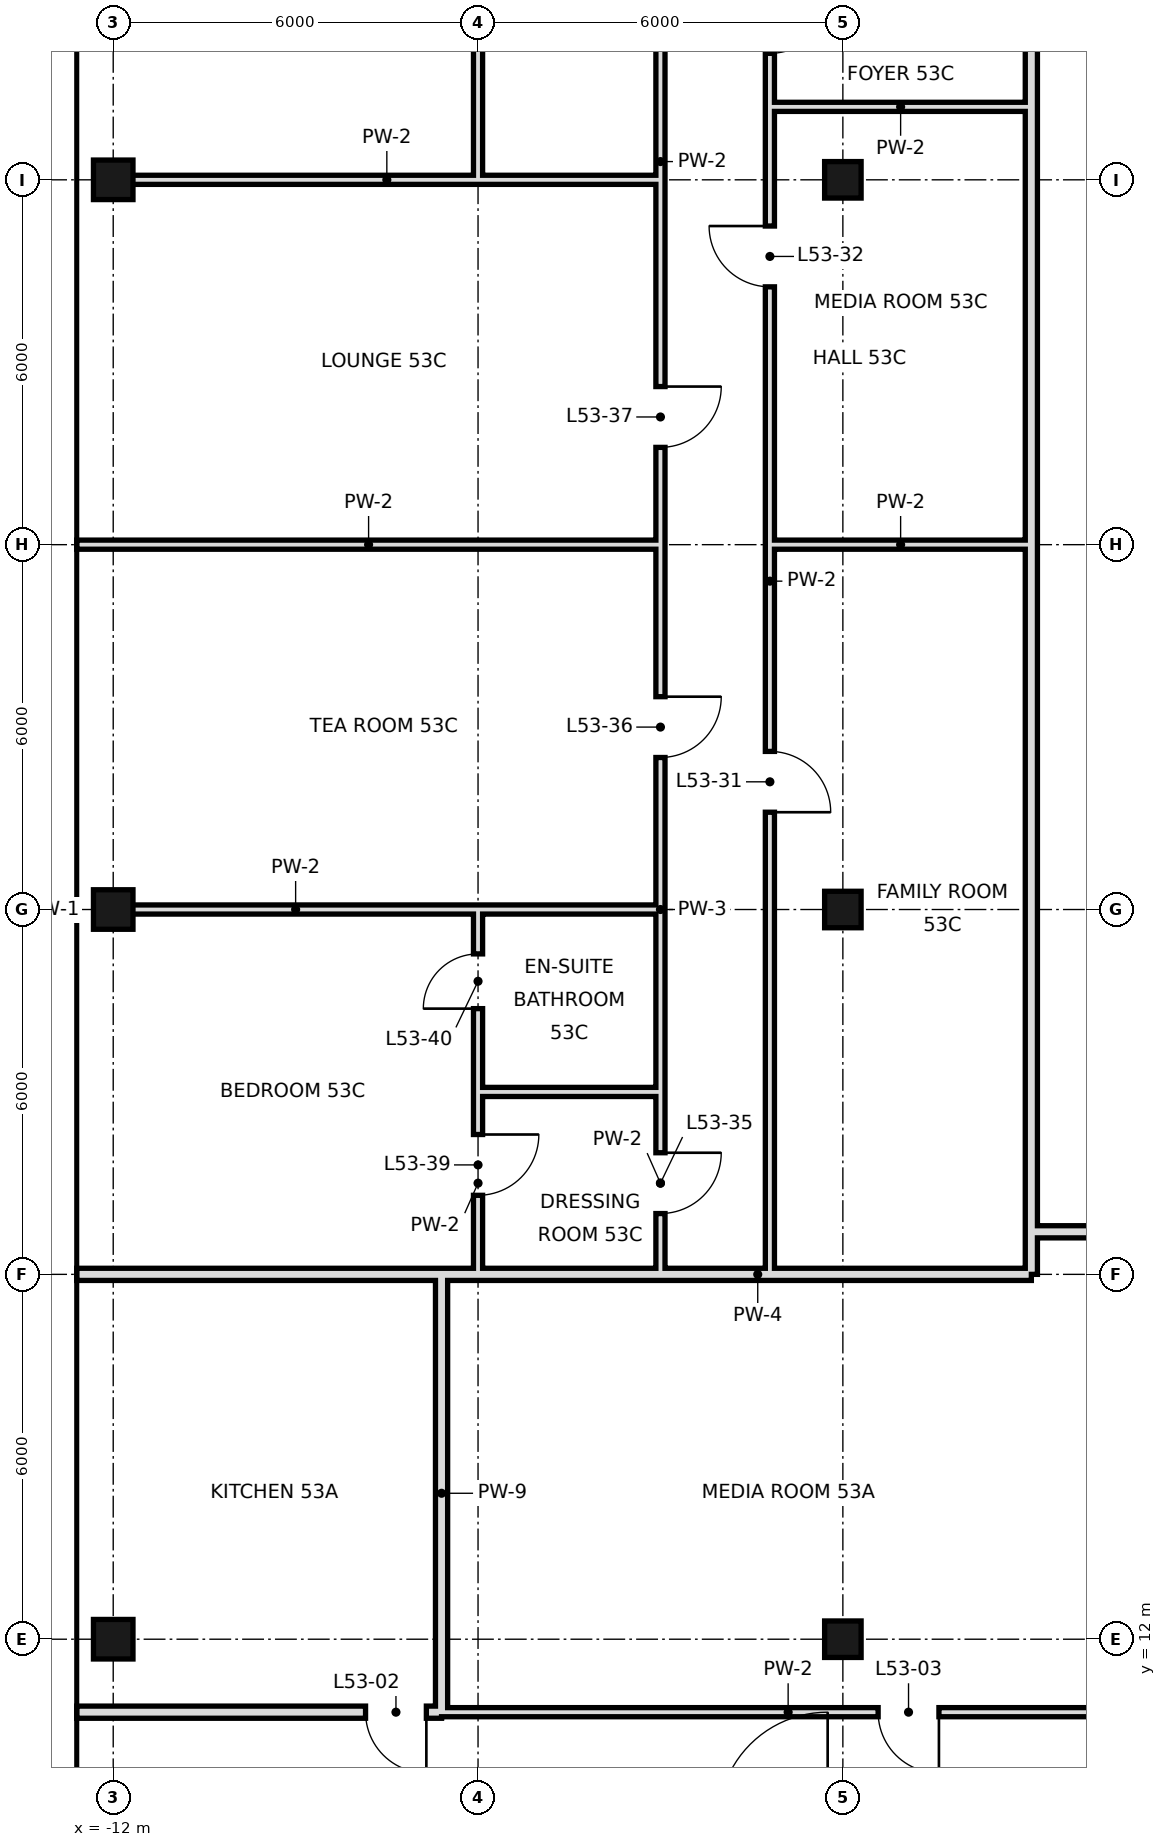
"""IFC4 building model, lengths in metres.
Left out: names, types, materials, properties, quantities, classifications, styles, units other than length and angle.
Written with IfcOpenShell. Run it as: python <this file> out.ifc"""

import sys

from ifc_helpers import new_model, si_unit, direction, frame, frame_2d, origin, origin_2d, place, context, subcontext, project, spatial, rectangle, hollow_rectangle, extrude, element, fill, save


model = new_model("IFC4")
c1 = context("Model", 3, precision=1e-05, world=origin(), true_north=direction((0.0, 1.0)))
c2 = subcontext(c1, "Body", "Model", "MODEL_VIEW")
j1 = project(units=[si_unit("LENGTHUNIT", "METRE"), si_unit("PLANEANGLEUNIT", "RADIAN")], contexts=[c1])
p1 = place(None, origin())
s1 = spatial("IfcSite", under=j1, at=p1, CompositionType="ELEMENT")
p2 = place(p1, origin())
s2 = spatial("IfcBuilding", under=s1, at=p2, CompositionType="ELEMENT")
p3 = place(p2, frame((0.0, 0.0, 226.2)))
s3 = spatial("IfcBuildingStorey", under=s2, at=p3, CompositionType="ELEMENT", Elevation=226.2)
for number, where, z_axis, x_axis in (
    (1, (-12.0, 12.0, 0.0), (0.0, 0.0, 1.0), (1.0, 0.0, 0.0)),
    (2, (-12.0, 24.0, 0.0), (0.0, 0.0, 1.0), (1.0, 0.0, 0.0)),
    (3, (-12.0, 36.0, 0.0), (0.0, 0.0, 1.0), (1.0, 0.0, 0.0)),
):
    element("IfcColumn", number, at=place(p3, frame(where, z_axis=z_axis, x_axis=x_axis)), inside=s3, PredefinedType="COLUMN", context=c2, shape_type="SweptSolid", body=[
        extrude(hollow_rectangle(XDim=0.65, YDim=0.65, WallThickness=0.032, at=origin_2d()), origin(), (0.0, 0.0, 1.0), 3.6),
    ])
for number, where, z_axis, x_axis in (
    (4, (0.0, 12.0, 0.0), (0.0, 0.0, 1.0), (1.0, 0.0, 0.0)),
    (5, (0.0, 24.0, 0.0), (0.0, 0.0, 1.0), (1.0, 0.0, 0.0)),
    (6, (0.0, 36.0, 0.0), (0.0, 0.0, 1.0), (1.0, 0.0, 0.0)),
):
    element("IfcColumn", number, at=place(p3, frame(where, z_axis=z_axis, x_axis=x_axis)), inside=s3, PredefinedType="COLUMN", context=c2, shape_type="SweptSolid", body=[
        extrude(hollow_rectangle(XDim=0.6, YDim=0.6, WallThickness=0.028, at=origin_2d()), origin(), (0.0, 0.0, 1.0), 3.6),
    ])
p4 = place(p3, frame((-1.2, 18.0, 0.0), z_axis=(0.0, 0.0, 1.0), x_axis=(0.0, 1.0, 0.0)))
e7 = element("IfcWall", 7, at=p4, inside=s3, PredefinedType="PARTITIONING", context=c2, shape_type="SweptSolid", body=[
    extrude(rectangle(XDim=22.8, YDim=0.15, at=frame_2d((11.4, 0.0))), origin(), (0.0, 0.0, 1.0), 3.42),
])
p5 = place(p4, frame((20.08, 0.0, 0.0)))
e8 = element("IfcOpeningElement", 8, at=p5, cuts=e7, PredefinedType="OPENING", context=c2, shape_type="SweptSolid", body=[
    extrude(rectangle(XDim=1.0, YDim=2.4, at=frame_2d((0.5, 1.2))), frame((0.0, 0.085, 0.0), z_axis=(0.0, -1.0, 0.0), x_axis=(1.0, 0.0, 0.0)), (0.0, 0.0, 1.0), 0.17),
])
p6 = place(p4, frame((7.6, 0.0, 0.0)))
e9 = element("IfcOpeningElement", 9, at=p6, cuts=e7, PredefinedType="OPENING", context=c2, shape_type="SweptSolid", body=[
    extrude(rectangle(XDim=1.0, YDim=2.4, at=frame_2d((0.5, 1.2))), frame((0.0, 0.085, 0.0), z_axis=(0.0, -1.0, 0.0), x_axis=(1.0, 0.0, 0.0)), (0.0, 0.0, 1.0), 0.17),
])
p7 = place(p4, frame((16.24, 0.0, 0.0)))
e10 = element("IfcOpeningElement", 10, at=p7, cuts=e7, PredefinedType="OPENING", context=c2, shape_type="SweptSolid", body=[
    extrude(rectangle(XDim=1.0, YDim=2.4, at=frame_2d((0.5, 1.2))), frame((0.0, 0.085, 0.0), z_axis=(0.0, -1.0, 0.0), x_axis=(1.0, 0.0, 0.0)), (0.0, 0.0, 1.0), 0.17),
])
p8 = place(p3, frame((-3.0, 18.0, 0.0), z_axis=(0.0, 0.0, 1.0), x_axis=(0.0, 1.0, 0.0)))
e11 = element("IfcWall", 11, at=p8, inside=s3, PredefinedType="PARTITIONING", context=c2, shape_type="SweptSolid", body=[
    extrude(rectangle(XDim=3.0, YDim=0.15, at=frame_2d((1.5, 0.0))), origin(), (0.0, 0.0, 1.0), 3.42),
])
p9 = place(p8, frame((1.0, 0.0, 0.0)))
e12 = element("IfcOpeningElement", 12, at=p9, cuts=e11, PredefinedType="OPENING", context=c2, shape_type="SweptSolid", body=[
    extrude(rectangle(XDim=1.0, YDim=2.4, at=frame_2d((0.5, 1.2))), frame((0.0, 0.085, 0.0), z_axis=(0.0, -1.0, 0.0), x_axis=(1.0, 0.0, 0.0)), (0.0, 0.0, 1.0), 0.17),
])
p10 = place(p3, frame((-3.0, 24.0, 0.0), z_axis=(0.0, 0.0, 1.0), x_axis=(0.0, 1.0, 0.0)))
e13 = element("IfcWall", 13, at=p10, inside=s3, PredefinedType="PARTITIONING", context=c2, shape_type="SweptSolid", body=[
    extrude(rectangle(XDim=24.6, YDim=0.15, at=frame_2d((12.3, 0.0))), origin(), (0.0, 0.0, 1.0), 3.42),
])
p11 = place(p10, frame((2.5, 0.0, 0.0)))
e14 = element("IfcOpeningElement", 14, at=p11, cuts=e13, PredefinedType="OPENING", context=c2, shape_type="SweptSolid", body=[
    extrude(rectangle(XDim=1.0, YDim=2.4, at=frame_2d((0.5, 1.2))), frame((0.0, 0.085, 0.0), z_axis=(0.0, -1.0, 0.0), x_axis=(1.0, 0.0, 0.0)), (0.0, 0.0, 1.0), 0.17),
])
p12 = place(p10, frame((7.6, 0.0, 0.0)))
e15 = element("IfcOpeningElement", 15, at=p12, cuts=e13, PredefinedType="OPENING", context=c2, shape_type="SweptSolid", body=[
    extrude(rectangle(XDim=1.0, YDim=2.4, at=frame_2d((0.5, 1.2))), frame((0.0, 0.085, 0.0), z_axis=(0.0, -1.0, 0.0), x_axis=(1.0, 0.0, 0.0)), (0.0, 0.0, 1.0), 0.17),
])
p13 = place(p10, frame((19.04, 0.0, 0.0)))
e16 = element("IfcOpeningElement", 16, at=p13, cuts=e13, PredefinedType="OPENING", context=c2, shape_type="SweptSolid", body=[
    extrude(rectangle(XDim=1.8, YDim=2.4, at=frame_2d((0.9, 1.2))), frame((0.0, 0.085, 0.0), z_axis=(0.0, -1.0, 0.0), x_axis=(1.0, 0.0, 0.0)), (0.0, 0.0, 1.0), 0.17),
])
p14 = place(p3, frame((-3.0, 21.0, 0.0), z_axis=(0.0, 0.0, 1.0), x_axis=(0.0, 1.0, 0.0)))
e17 = element("IfcWall", 17, at=p14, inside=s3, PredefinedType="PARTITIONING", context=c2, shape_type="SweptSolid", body=[
    extrude(rectangle(XDim=3.0, YDim=0.15, at=frame_2d((1.5, 0.0))), origin(), (0.0, 0.0, 1.0), 3.42),
])
p15 = place(p3, frame((-6.0, 18.0, 0.0), z_axis=(0.0, 0.0, 1.0), x_axis=(0.0, 1.0, 0.0)))
e18 = element("IfcWall", 18, at=p15, inside=s3, PredefinedType="PARTITIONING", context=c2, shape_type="SweptSolid", body=[
    extrude(rectangle(XDim=3.0, YDim=0.15, at=frame_2d((1.5, 0.0))), origin(), (0.0, 0.0, 1.0), 3.42),
])
p16 = place(p15, frame((1.3, 0.0, 0.0)))
e19 = element("IfcOpeningElement", 19, at=p16, cuts=e18, PredefinedType="OPENING", context=c2, shape_type="SweptSolid", body=[
    extrude(rectangle(XDim=1.0, YDim=2.4, at=frame_2d((0.5, 1.2))), frame((0.0, 0.085, 0.0), z_axis=(0.0, -1.0, 0.0), x_axis=(1.0, 0.0, 0.0)), (0.0, 0.0, 1.0), 0.17),
])
p17 = place(p3, frame((-6.0, 36.0, 0.0), z_axis=(0.0, 0.0, 1.0), x_axis=(0.0, 1.0, 0.0)))
e20 = element("IfcWall", 20, at=p17, inside=s3, PredefinedType="PARTITIONING", context=c2, shape_type="SweptSolid", body=[
    extrude(rectangle(XDim=12.0, YDim=0.15, at=frame_2d((6.0, 0.0))), origin(), (0.0, 0.0, 1.0), 3.42),
])
p18 = place(p17, frame((3.16, 0.0, 0.0)))
e21 = element("IfcOpeningElement", 21, at=p18, cuts=e20, PredefinedType="OPENING", context=c2, shape_type="SweptSolid", body=[
    extrude(rectangle(XDim=1.8, YDim=2.4, at=frame_2d((0.9, 1.2))), frame((0.0, 0.085, 0.0), z_axis=(0.0, -1.0, 0.0), x_axis=(1.0, 0.0, 0.0)), (0.0, 0.0, 1.0), 0.17),
])
p19 = place(p3, frame((-6.0, 21.0, 0.0), z_axis=(0.0, 0.0, 1.0), x_axis=(0.0, 1.0, 0.0)))
e22 = element("IfcWall", 22, at=p19, inside=s3, PredefinedType="PARTITIONING", context=c2, shape_type="SweptSolid", body=[
    extrude(rectangle(XDim=3.0, YDim=0.15, at=frame_2d((1.5, 0.0))), origin(), (0.0, 0.0, 1.0), 3.42),
])
p20 = place(p19, frame((1.37, 0.0, 0.0)))
e23 = element("IfcOpeningElement", 23, at=p20, cuts=e22, PredefinedType="OPENING", context=c2, shape_type="SweptSolid", body=[
    extrude(rectangle(XDim=0.9, YDim=2.4, at=frame_2d((0.45, 1.2))), frame((0.0, 0.085, 0.0), z_axis=(0.0, -1.0, 0.0), x_axis=(1.0, 0.0, 0.0)), (0.0, 0.0, 1.0), 0.17),
])
p21 = place(p3, frame((-6.6, 10.8, 0.0), z_axis=(0.0, 0.0, 1.0), x_axis=(0.0, 1.0, 0.0)))
e24 = element("IfcWall", 24, at=p21, inside=s3, PredefinedType="SOLIDWALL", context=c2, shape_type="SweptSolid", body=[
    extrude(rectangle(XDim=7.2, YDim=0.2, at=frame_2d((3.6, 0.0))), origin(), (0.0, 0.0, 1.0), 2.72),
])
p22 = place(p3, frame((3.1, 18.7, 0.0), z_axis=(0.0, 0.0, 1.0), x_axis=(0.0, 1.0, 0.0)))
e25 = element("IfcWall", 25, at=p22, inside=s3, PredefinedType="SOLIDWALL", context=c2, shape_type="SweptSolid", body=[
    extrude(rectangle(XDim=22.1, YDim=0.2, at=frame_2d((11.05, 0.0))), origin(), (0.0, 0.0, 1.0), 2.97),
])
p23 = place(p22, frame((20.08, 0.0, 0.0)))
e26 = element("IfcOpeningElement", 26, at=p23, cuts=e25, PredefinedType="OPENING", context=c2, shape_type="SweptSolid", body=[
    extrude(rectangle(XDim=1.2, YDim=2.4, at=frame_2d((0.6, 1.2))), frame((0.0, 0.11, 0.0), z_axis=(0.0, -1.0, 0.0), x_axis=(1.0, 0.0, 0.0)), (0.0, 0.0, 1.0), 0.22),
])
p24 = place(p3, frame((3.1, 18.0, 0.0), z_axis=(0.0, 0.0, 1.0), x_axis=(0.0, 1.0, 0.0)))
e27 = element("IfcWall", 27, at=p24, inside=s3, PredefinedType="SOLIDWALL", context=c2, shape_type="SweptSolid", body=[
    extrude(rectangle(XDim=0.7, YDim=0.2, at=frame_2d((0.35, 0.0))), origin(), (0.0, 0.0, 1.0), 2.97),
])
p25 = place(p3, frame((-12.6, 10.8, 0.0), z_axis=(0.0, 0.0, 1.0), x_axis=(1.0, 0.0, 0.0)))
e28 = element("IfcWall", 28, at=p25, inside=s3, PredefinedType="SOLIDWALL", context=c2, shape_type="SweptSolid", body=[
    extrude(rectangle(XDim=6.0, YDim=0.2, at=frame_2d((3.0, 0.0))), origin(), (0.0, 0.0, 1.0), 2.97),
])
p26 = place(p25, frame((4.75, 0.0, 0.0)))
e29 = element("IfcOpeningElement", 29, at=p26, cuts=e28, PredefinedType="OPENING", context=c2, shape_type="SweptSolid", body=[
    extrude(rectangle(XDim=1.0, YDim=2.4, at=frame_2d((0.5, 1.2))), frame((0.0, 0.11, 0.0), z_axis=(0.0, -1.0, 0.0), x_axis=(1.0, 0.0, 0.0)), (0.0, 0.0, 1.0), 0.22),
])
p27 = place(p3, frame((-6.6, 10.8, 0.0), z_axis=(0.0, 0.0, 1.0), x_axis=(1.0, 0.0, 0.0)))
e30 = element("IfcWall", 30, at=p27, inside=s3, PredefinedType="PARTITIONING", context=c2, shape_type="SweptSolid", body=[
    extrude(rectangle(XDim=11.4, YDim=0.15, at=frame_2d((5.7, 0.0))), origin(), (0.0, 0.0, 1.0), 3.42),
])
p28 = place(p27, frame((7.18, 0.0, 0.0)))
e31 = element("IfcOpeningElement", 31, at=p28, cuts=e30, PredefinedType="OPENING", context=c2, shape_type="SweptSolid", body=[
    extrude(rectangle(XDim=1.0, YDim=2.4, at=frame_2d((0.5, 1.2))), frame((0.0, 0.085, 0.0), z_axis=(0.0, -1.0, 0.0), x_axis=(1.0, 0.0, 0.0)), (0.0, 0.0, 1.0), 0.17),
])
p29 = place(p3, frame((-12.6, 18.0, 0.0), z_axis=(0.0, 0.0, 1.0), x_axis=(1.0, 0.0, 0.0)))
e32 = element("IfcWall", 32, at=p29, inside=s3, PredefinedType="SOLIDWALL", context=c2, shape_type="SweptSolid", body=[
    extrude(rectangle(XDim=6.0, YDim=0.2, at=frame_2d((3.0, 0.0))), origin(), (0.0, 0.0, 1.0), 2.72),
])
p30 = place(p3, frame((-6.6, 18.0, 0.0), z_axis=(0.0, 0.0, 1.0), x_axis=(1.0, 0.0, 0.0)))
e33 = element("IfcWall", 33, at=p30, inside=s3, PredefinedType="SOLIDWALL", context=c2, shape_type="SweptSolid", body=[
    extrude(rectangle(XDim=9.7, YDim=0.2, at=frame_2d((4.85, 0.0))), origin(), (0.0, 0.0, 1.0), 2.72),
])
p31 = place(p3, frame((3.1, 18.7, 0.0), z_axis=(0.0, 0.0, 1.0), x_axis=(1.0, 0.0, 0.0)))
e34 = element("IfcWall", 34, at=p31, inside=s3, PredefinedType="SOLIDWALL", context=c2, shape_type="SweptSolid", body=[
    extrude(rectangle(XDim=41.8, YDim=0.2, at=frame_2d((20.9, 0.0))), origin(), (0.0, 0.0, 1.0), 2.72),
])
p32 = place(p31, frame((7.36, 0.0, 0.0)))
e35 = element("IfcOpeningElement", 35, at=p32, cuts=e34, PredefinedType="OPENING", context=c2, shape_type="SweptSolid", body=[
    extrude(rectangle(XDim=1.2, YDim=2.4, at=frame_2d((0.6, 1.2))), frame((0.0, 0.11, 0.0), z_axis=(0.0, -1.0, 0.0), x_axis=(1.0, 0.0, 0.0)), (0.0, 0.0, 1.0), 0.22),
])
p33 = place(p31, frame((24.48, 0.0, 0.0)))
e36 = element("IfcOpeningElement", 36, at=p33, cuts=e34, PredefinedType="OPENING", context=c2, shape_type="SweptSolid", body=[
    extrude(rectangle(XDim=1.2, YDim=2.4, at=frame_2d((0.6, 1.2))), frame((0.0, 0.11, 0.0), z_axis=(0.0, -1.0, 0.0), x_axis=(1.0, 0.0, 0.0)), (0.0, 0.0, 1.0), 0.22),
])
p34 = place(p3, frame((-6.0, 21.0, 0.0), z_axis=(0.0, 0.0, 1.0), x_axis=(1.0, 0.0, 0.0)))
e37 = element("IfcWall", 37, at=p34, inside=s3, PredefinedType="PARTITIONING", context=c2, shape_type="SweptSolid", body=[
    extrude(rectangle(XDim=3.0, YDim=0.15, at=frame_2d((1.5, 0.0))), origin(), (0.0, 0.0, 1.0), 3.42),
])
p35 = place(p3, frame((-12.0, 24.0, 0.0), z_axis=(0.0, 0.0, 1.0), x_axis=(1.0, 0.0, 0.0)))
e38 = element("IfcWall", 38, at=p35, inside=s3, PredefinedType="PARTITIONING", context=c2, shape_type="SweptSolid", body=[
    extrude(rectangle(XDim=6.0, YDim=0.15, at=frame_2d((3.0, 0.0))), origin(), (0.0, 0.0, 1.0), 2.72),
])
p36 = place(p3, frame((-6.0, 24.0, 0.0), z_axis=(0.0, 0.0, 1.0), x_axis=(1.0, 0.0, 0.0)))
e39 = element("IfcWall", 39, at=p36, inside=s3, PredefinedType="PARTITIONING", context=c2, shape_type="SweptSolid", body=[
    extrude(rectangle(XDim=3.0, YDim=0.15, at=frame_2d((1.5, 0.0))), origin(), (0.0, 0.0, 1.0), 2.72),
])
p37 = place(p3, frame((-12.6, 30.0, 0.0), z_axis=(0.0, 0.0, 1.0), x_axis=(1.0, 0.0, 0.0)))
e40 = element("IfcWall", 40, at=p37, inside=s3, PredefinedType="PARTITIONING", context=c2, shape_type="SweptSolid", body=[
    extrude(rectangle(XDim=9.6, YDim=0.15, at=frame_2d((4.8, 0.0))), origin(), (0.0, 0.0, 1.0), 2.72),
])
p38 = place(p3, frame((-1.2, 30.0, 0.0), z_axis=(0.0, 0.0, 1.0), x_axis=(1.0, 0.0, 0.0)))
e41 = element("IfcWall", 41, at=p38, inside=s3, PredefinedType="PARTITIONING", context=c2, shape_type="SweptSolid", body=[
    extrude(rectangle(XDim=4.3, YDim=0.15, at=frame_2d((2.15, 0.0))), origin(), (0.0, 0.0, 1.0), 2.72),
])
p39 = place(p3, frame((-12.0, 36.0, 0.0), z_axis=(0.0, 0.0, 1.0), x_axis=(1.0, 0.0, 0.0)))
e42 = element("IfcWall", 42, at=p39, inside=s3, PredefinedType="PARTITIONING", context=c2, shape_type="SweptSolid", body=[
    extrude(rectangle(XDim=9.0, YDim=0.15, at=frame_2d((4.5, 0.0))), origin(), (0.0, 0.0, 1.0), 2.72),
])
p40 = place(p3, frame((-1.2, 37.2, 0.0), z_axis=(0.0, 0.0, 1.0), x_axis=(1.0, 0.0, 0.0)))
e43 = element("IfcWall", 43, at=p40, inside=s3, PredefinedType="PARTITIONING", context=c2, shape_type="SweptSolid", body=[
    extrude(rectangle(XDim=4.3, YDim=0.15, at=frame_2d((2.15, 0.0))), origin(), (0.0, 0.0, 1.0), 3.42),
])
p41 = place(p26, origin())
e44 = element("IfcDoor", 44, at=p41, inside=s3, OperationType="SINGLE_SWING_RIGHT", PredefinedType="DOOR", context=c2, shape_type="SweptSolid", body=[
    extrude(rectangle(XDim=1.0, YDim=2.4, at=frame_2d((0.5, 1.2))), frame((0.0, 0.025, 0.0), z_axis=(0.0, -1.0, 0.0), x_axis=(1.0, 0.0, 0.0)), (0.0, 0.0, 1.0), 0.05),
])
fill(e29, e44)
p42 = place(p28, origin())
e45 = element("IfcDoor", 45, at=p42, inside=s3, OperationType="SINGLE_SWING_RIGHT", PredefinedType="DOOR", context=c2, shape_type="SweptSolid", body=[
    extrude(rectangle(XDim=1.0, YDim=2.4, at=frame_2d((0.5, 1.2))), frame((0.0, 0.025, 0.0), z_axis=(0.0, -1.0, 0.0), x_axis=(1.0, 0.0, 0.0)), (0.0, 0.0, 1.0), 0.05),
])
fill(e31, e45)
p43 = place(p5, origin())
e46 = element("IfcDoor", 46, at=p43, inside=s3, OperationType="SINGLE_SWING_RIGHT", PredefinedType="DOOR", context=c2, shape_type="SweptSolid", body=[
    extrude(rectangle(XDim=1.0, YDim=2.4, at=frame_2d((0.5, 1.2))), frame((0.0, 0.025, 0.0), z_axis=(0.0, -1.0, 0.0), x_axis=(1.0, 0.0, 0.0)), (0.0, 0.0, 1.0), 0.05),
])
fill(e8, e46)
p44 = place(p6, frame((1.0, 0.0, 0.0), z_axis=(0.0, 0.0, 1.0), x_axis=(-1.0, 0.0, 0.0)))
e47 = element("IfcDoor", 47, at=p44, inside=s3, OperationType="SINGLE_SWING_RIGHT", PredefinedType="DOOR", context=c2, shape_type="SweptSolid", body=[
    extrude(rectangle(XDim=1.0, YDim=2.4, at=frame_2d((0.5, 1.2))), frame((0.0, 0.025, 0.0), z_axis=(0.0, -1.0, 0.0), x_axis=(1.0, 0.0, 0.0)), (0.0, 0.0, 1.0), 0.05),
])
fill(e9, e47)
p45 = place(p7, frame((1.0, 0.0, 0.0), z_axis=(0.0, 0.0, 1.0), x_axis=(-1.0, 0.0, 0.0)))
e48 = element("IfcDoor", 48, at=p45, inside=s3, OperationType="SINGLE_SWING_LEFT", PredefinedType="DOOR", context=c2, shape_type="SweptSolid", body=[
    extrude(rectangle(XDim=1.0, YDim=2.4, at=frame_2d((0.5, 1.2))), frame((0.0, 0.025, 0.0), z_axis=(0.0, -1.0, 0.0), x_axis=(1.0, 0.0, 0.0)), (0.0, 0.0, 1.0), 0.05),
])
fill(e10, e48)
p46 = place(p9, origin())
e49 = element("IfcDoor", 49, at=p46, inside=s3, OperationType="SINGLE_SWING_RIGHT", PredefinedType="DOOR", context=c2, shape_type="SweptSolid", body=[
    extrude(rectangle(XDim=1.0, YDim=2.4, at=frame_2d((0.5, 1.2))), frame((0.0, 0.025, 0.0), z_axis=(0.0, -1.0, 0.0), x_axis=(1.0, 0.0, 0.0)), (0.0, 0.0, 1.0), 0.05),
])
fill(e12, e49)
p47 = place(p11, origin())
e50 = element("IfcDoor", 50, at=p47, inside=s3, OperationType="SINGLE_SWING_RIGHT", PredefinedType="DOOR", context=c2, shape_type="SweptSolid", body=[
    extrude(rectangle(XDim=1.0, YDim=2.4, at=frame_2d((0.5, 1.2))), frame((0.0, 0.025, 0.0), z_axis=(0.0, -1.0, 0.0), x_axis=(1.0, 0.0, 0.0)), (0.0, 0.0, 1.0), 0.05),
])
fill(e14, e50)
p48 = place(p12, origin())
e51 = element("IfcDoor", 51, at=p48, inside=s3, OperationType="SINGLE_SWING_RIGHT", PredefinedType="DOOR", context=c2, shape_type="SweptSolid", body=[
    extrude(rectangle(XDim=1.0, YDim=2.4, at=frame_2d((0.5, 1.2))), frame((0.0, 0.025, 0.0), z_axis=(0.0, -1.0, 0.0), x_axis=(1.0, 0.0, 0.0)), (0.0, 0.0, 1.0), 0.05),
])
fill(e15, e51)
p49 = place(p16, origin())
e52 = element("IfcDoor", 52, at=p49, inside=s3, OperationType="SINGLE_SWING_RIGHT", PredefinedType="DOOR", context=c2, shape_type="SweptSolid", body=[
    extrude(rectangle(XDim=1.0, YDim=2.4, at=frame_2d((0.5, 1.2))), frame((0.0, 0.025, 0.0), z_axis=(0.0, -1.0, 0.0), x_axis=(1.0, 0.0, 0.0)), (0.0, 0.0, 1.0), 0.05),
])
fill(e19, e52)
p50 = place(p20, origin())
e53 = element("IfcDoor", 53, at=p50, inside=s3, OperationType="SINGLE_SWING_LEFT", PredefinedType="DOOR", context=c2, shape_type="SweptSolid", body=[
    extrude(rectangle(XDim=0.9, YDim=2.4, at=frame_2d((0.45, 1.2))), frame((0.0, 0.025, 0.0), z_axis=(0.0, -1.0, 0.0), x_axis=(1.0, 0.0, 0.0)), (0.0, 0.0, 1.0), 0.05),
])
fill(e23, e53)
save(model, sys.argv[1])
